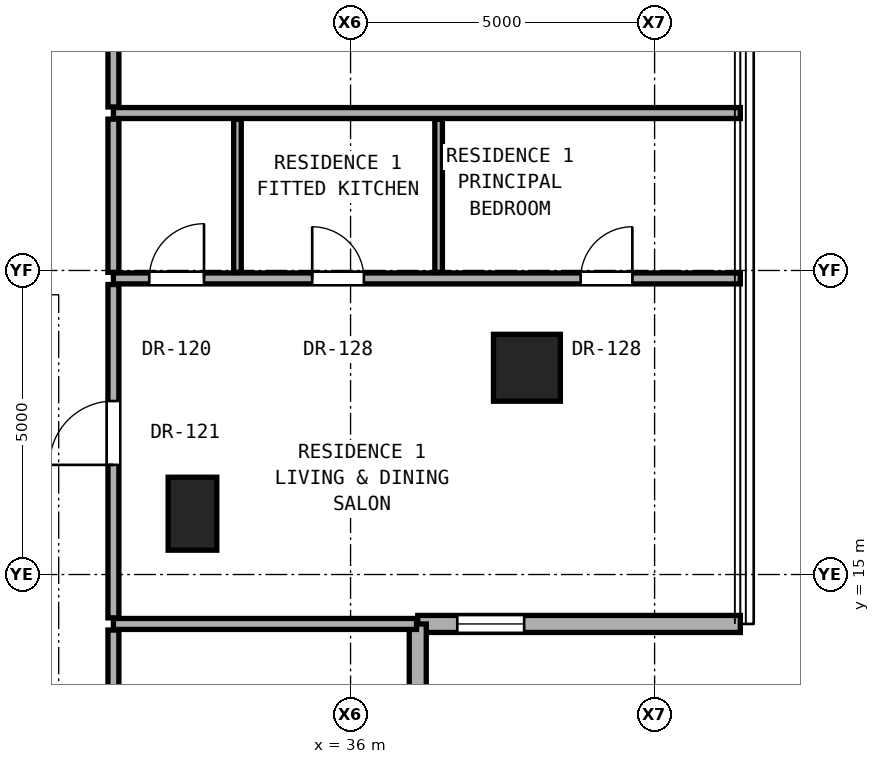
"""IFC4 building model, lengths in metres.
Left out: names, types, materials, properties, quantities, classifications, styles, units other than length and angle.
Written with IfcOpenShell. Run it as: python <this file> out.ifc"""

import sys

from ifc_helpers import new_model, si_unit, direction, frame, frame_2d, origin, origin_2d, place, context, subcontext, project, spatial, rectangle, hollow_rectangle, extrude, element, fill, save


model = new_model("IFC4")
c1 = context("Model", 3, precision=1e-05, world=origin(), true_north=direction((0.0, 1.0)))
c2 = subcontext(c1, "Body", "Model", "MODEL_VIEW")
j1 = project(units=[si_unit("LENGTHUNIT", "METRE"), si_unit("PLANEANGLEUNIT", "RADIAN")], contexts=[c1])
p1 = place(None, origin())
s1 = spatial("IfcSite", under=j1, at=p1, CompositionType="ELEMENT")
p2 = place(p1, origin())
s2 = spatial("IfcBuilding", under=s1, at=p2, CompositionType="ELEMENT")
p3 = place(p2, frame((0.0, 0.0, 108.2)))
s3 = spatial("IfcBuildingStorey", under=s2, at=p3, CompositionType="ELEMENT", Elevation=108.2)
p4 = place(p3, frame((38.9, 18.4, 0.0), z_axis=(0.0, 0.0, 1.0), x_axis=(1.0, 0.0, 0.0)))
e1 = element("IfcColumn", 1, at=p4, inside=s3, PredefinedType="COLUMN", context=c2, shape_type="SweptSolid", body=[
    extrude(hollow_rectangle(XDim=1.1, YDim=1.1, WallThickness=0.06, at=origin_2d()), origin(), (0.0, 0.0, 1.0), 3.3),
])
p5 = place(p3, frame((33.4, 16.0, 0.0), z_axis=(0.0, 0.0, 1.0), x_axis=(1.0, 0.0, 0.0)))
e2 = element("IfcColumn", 2, at=p5, inside=s3, PredefinedType="PILASTER", context=c2, shape_type="SweptSolid", body=[
    extrude(rectangle(XDim=0.8, YDim=1.2, at=origin_2d()), origin(), (0.0, 0.0, 1.0), 3.3),
])
p6 = place(p3, frame((37.105, 14.187, 0.0), z_axis=(0.0, 0.0, 1.0), x_axis=(1.0, 0.0, 0.0)))
e3 = element("IfcWall", 3, at=p6, inside=s3, PredefinedType="SOLIDWALL", context=c2, shape_type="SweptSolid", body=[
    extrude(rectangle(XDim=5.305, YDim=0.28, at=frame_2d((2.652, 0.0))), origin(), (0.0, 0.0, 1.0), 3.06),
])
p7 = place(p6, frame((0.65, 0.0, 0.85)))
e4 = element("IfcOpeningElement", 4, at=p7, cuts=e3, PredefinedType="OPENING", context=c2, shape_type="SweptSolid", body=[
    extrude(rectangle(XDim=1.1, YDim=2.0, at=frame_2d((0.55, 1.0))), frame((0.0, 0.15, 0.0), z_axis=(0.0, -1.0, 0.0), x_axis=(1.0, 0.0, 0.0)), (0.0, 0.0, 1.0), 0.3),
])
p8 = place(p3, frame((37.105, 8.882, 0.0), z_axis=(0.0, 0.0, 1.0), x_axis=(0.0, 1.0, 0.0)))
e5 = element("IfcWall", 5, at=p8, inside=s3, PredefinedType="SOLIDWALL", context=c2, shape_type="SweptSolid", body=[
    extrude(rectangle(XDim=5.305, YDim=0.28, at=frame_2d((2.652, 0.0))), origin(), (0.0, 0.0, 1.0), 3.06),
])
p9 = place(p3, frame((32.1, 14.187, 0.0), z_axis=(0.0, 0.0, 1.0), x_axis=(1.0, 0.0, 0.0)))
e6 = element("IfcWall", 6, at=p9, inside=s3, PredefinedType="PARTITIONING", context=c2, shape_type="SweptSolid", body=[
    extrude(rectangle(XDim=4.985, YDim=0.18, at=frame_2d((2.492, 0.0))), origin(), (0.0, 0.0, 1.0), 3.08),
])
p10 = place(p3, frame((32.1, 19.869, 0.0), z_axis=(0.0, 0.0, 1.0), x_axis=(1.0, 0.0, 0.0)))
e7 = element("IfcWall", 7, at=p10, inside=s3, PredefinedType="PARTITIONING", context=c2, shape_type="SweptSolid", body=[
    extrude(rectangle(XDim=10.31, YDim=0.18, at=frame_2d((5.155, 0.0))), origin(), (0.0, 0.0, 1.0), 2.145),
])
p11 = place(p10, frame((7.684, 0.0, 0.0)))
e8 = element("IfcOpeningElement", 8, at=p11, cuts=e7, PredefinedType="OPENING", context=c2, shape_type="SweptSolid", body=[
    extrude(rectangle(XDim=0.85, YDim=2.01, at=frame_2d((0.425, 1.005))), frame((0.0, 0.1, 0.0), z_axis=(0.0, -1.0, 0.0), x_axis=(1.0, 0.0, 0.0)), (0.0, 0.0, 1.0), 0.2),
])
p12 = place(p10, frame((3.269, 0.0, 0.0)))
e9 = element("IfcOpeningElement", 9, at=p12, cuts=e7, PredefinedType="OPENING", context=c2, shape_type="SweptSolid", body=[
    extrude(rectangle(XDim=0.85, YDim=2.01, at=frame_2d((0.425, 1.005))), frame((0.0, 0.1, 0.0), z_axis=(0.0, -1.0, 0.0), x_axis=(1.0, 0.0, 0.0)), (0.0, 0.0, 1.0), 0.2),
])
p13 = place(p10, frame((0.59, 0.0, 0.0)))
e10 = element("IfcOpeningElement", 10, at=p13, cuts=e7, PredefinedType="OPENING", context=c2, shape_type="SweptSolid", body=[
    extrude(rectangle(XDim=0.9, YDim=2.1, at=frame_2d((0.45, 1.05))), frame((0.0, 0.1, 0.0), z_axis=(0.0, -1.0, 0.0), x_axis=(1.0, 0.0, 0.0)), (0.0, 0.0, 1.0), 0.2),
])
p14 = place(p3, frame((32.1, 22.589, 0.0), z_axis=(0.0, 0.0, 1.0), x_axis=(1.0, 0.0, 0.0)))
e11 = element("IfcWall", 11, at=p14, inside=s3, PredefinedType="PARTITIONING", context=c2, shape_type="SweptSolid", body=[
    extrude(rectangle(XDim=10.31, YDim=0.18, at=frame_2d((5.155, 0.0))), origin(), (0.0, 0.0, 1.0), 2.145),
])
p15 = place(p3, frame((32.1, 8.882, 0.0), z_axis=(0.0, 0.0, 1.0), x_axis=(0.0, 1.0, 0.0)))
e12 = element("IfcWall", 12, at=p15, inside=s3, PredefinedType="PARTITIONING", context=c2, shape_type="SweptSolid", body=[
    extrude(rectangle(XDim=5.205, YDim=0.18, at=frame_2d((2.603, 0.0))), origin(), (0.0, 0.0, 1.0), 3.08),
])
p16 = place(p15, frame((2.127, 0.0, 0.0)))
e13 = element("IfcOpeningElement", 13, at=p16, cuts=e12, PredefinedType="OPENING", context=c2, shape_type="SweptSolid", body=[
    extrude(rectangle(XDim=0.95, YDim=2.15, at=frame_2d((0.475, 1.075))), frame((0.0, 0.1, 0.0), z_axis=(0.0, -1.0, 0.0), x_axis=(1.0, 0.0, 0.0)), (0.0, 0.0, 1.0), 0.2),
])
p17 = place(p3, frame((32.1, 14.287, 0.0), z_axis=(0.0, 0.0, 1.0), x_axis=(0.0, 1.0, 0.0)))
e14 = element("IfcWall", 14, at=p17, inside=s3, PredefinedType="PARTITIONING", context=c2, shape_type="SweptSolid", body=[
    extrude(rectangle(XDim=5.482, YDim=0.18, at=frame_2d((2.741, 0.0))), origin(), (0.0, 0.0, 1.0), 2.456),
])
p18 = place(p17, frame((2.516, 0.0, 0.0)))
e15 = element("IfcOpeningElement", 15, at=p18, cuts=e14, PredefinedType="OPENING", context=c2, shape_type="SweptSolid", body=[
    extrude(rectangle(XDim=1.05, YDim=2.2, at=frame_2d((0.525, 1.1))), frame((0.0, 0.1, 0.0), z_axis=(0.0, -1.0, 0.0), x_axis=(1.0, 0.0, 0.0)), (0.0, 0.0, 1.0), 0.2),
])
p19 = place(p3, frame((32.1, 19.969, 0.0), z_axis=(0.0, 0.0, 1.0), x_axis=(0.0, 1.0, 0.0)))
e16 = element("IfcWall", 16, at=p19, inside=s3, PredefinedType="PARTITIONING", context=c2, shape_type="SweptSolid", body=[
    extrude(rectangle(XDim=2.52, YDim=0.18, at=frame_2d((1.26, 0.0))), origin(), (0.0, 0.0, 1.0), 3.08),
])
p20 = place(p3, frame((32.1, 22.689, 0.0), z_axis=(0.0, 0.0, 1.0), x_axis=(0.0, 1.0, 0.0)))
e17 = element("IfcWall", 17, at=p20, inside=s3, PredefinedType="PARTITIONING", context=c2, shape_type="SweptSolid", body=[
    extrude(rectangle(XDim=4.844, YDim=0.18, at=frame_2d((2.422, 0.0))), origin(), (0.0, 0.0, 1.0), 2.299),
])
p21 = place(p20, frame((1.897, 0.0, 0.0)))
e18 = element("IfcOpeningElement", 18, at=p21, cuts=e17, PredefinedType="OPENING", context=c2, shape_type="SweptSolid", body=[
    extrude(rectangle(XDim=1.05, YDim=2.2, at=frame_2d((0.525, 1.1))), frame((0.0, 0.1, 0.0), z_axis=(0.0, -1.0, 0.0), x_axis=(1.0, 0.0, 0.0)), (0.0, 0.0, 1.0), 0.2),
])
for number, where, z_axis, x_axis in (
    (19, (34.14, 19.969, 0.0), (0.0, 0.0, 1.0), (0.0, 1.0, 0.0)),
    (20, (37.448, 19.969, 0.0), (0.0, 0.0, 1.0), (0.0, 1.0, 0.0)),
):
    element("IfcWall", number, at=place(p3, frame(where, z_axis=z_axis, x_axis=x_axis)), inside=s3, PredefinedType="PARTITIONING", context=c2, shape_type="SweptSolid", body=[
        extrude(rectangle(XDim=2.52, YDim=0.125, at=frame_2d((1.26, 0.0))), origin(), (0.0, 0.0, 1.0), 3.08),
    ])
p22 = place(p7, origin())
e21 = element("IfcWindow", 21, at=p22, inside=s3, PartitioningType="SINGLE_PANEL", PredefinedType="WINDOW", context=c2, shape_type="SweptSolid", body=[
    extrude(rectangle(XDim=1.1, YDim=2.0, at=frame_2d((0.55, 1.0))), frame((0.0, 0.03, 0.0), z_axis=(0.0, -1.0, 0.0), x_axis=(1.0, 0.0, 0.0)), (0.0, 0.0, 1.0), 0.06),
])
fill(e4, e21)
p23 = place(p18, origin())
e22 = element("IfcDoor", 22, at=p23, inside=s3, OperationType="SINGLE_SWING_LEFT", PredefinedType="DOOR", context=c2, shape_type="SweptSolid", body=[
    extrude(rectangle(XDim=1.05, YDim=2.2, at=frame_2d((0.525, 1.1))), frame((0.0, 0.025, 0.0), z_axis=(0.0, -1.0, 0.0), x_axis=(1.0, 0.0, 0.0)), (0.0, 0.0, 1.0), 0.05),
])
fill(e15, e22)
p24 = place(p11, origin())
e23 = element("IfcDoor", 23, at=p24, inside=s3, OperationType="SINGLE_SWING_RIGHT", PredefinedType="DOOR", context=c2, shape_type="SweptSolid", body=[
    extrude(rectangle(XDim=0.85, YDim=2.01, at=frame_2d((0.425, 1.005))), frame((0.0, 0.025, 0.0), z_axis=(0.0, -1.0, 0.0), x_axis=(1.0, 0.0, 0.0)), (0.0, 0.0, 1.0), 0.05),
])
fill(e8, e23)
p25 = place(p12, origin())
e24 = element("IfcDoor", 24, at=p25, inside=s3, OperationType="SINGLE_SWING_LEFT", PredefinedType="DOOR", context=c2, shape_type="SweptSolid", body=[
    extrude(rectangle(XDim=0.85, YDim=2.01, at=frame_2d((0.425, 1.005))), frame((0.0, 0.025, 0.0), z_axis=(0.0, -1.0, 0.0), x_axis=(1.0, 0.0, 0.0)), (0.0, 0.0, 1.0), 0.05),
])
fill(e9, e24)
p26 = place(p13, origin())
e25 = element("IfcDoor", 25, at=p26, inside=s3, OperationType="SINGLE_SWING_RIGHT", PredefinedType="DOOR", context=c2, shape_type="SweptSolid", body=[
    extrude(rectangle(XDim=0.9, YDim=2.1, at=frame_2d((0.45, 1.05))), frame((0.0, 0.025, 0.0), z_axis=(0.0, -1.0, 0.0), x_axis=(1.0, 0.0, 0.0)), (0.0, 0.0, 1.0), 0.05),
])
fill(e10, e25)
save(model, sys.argv[1])
